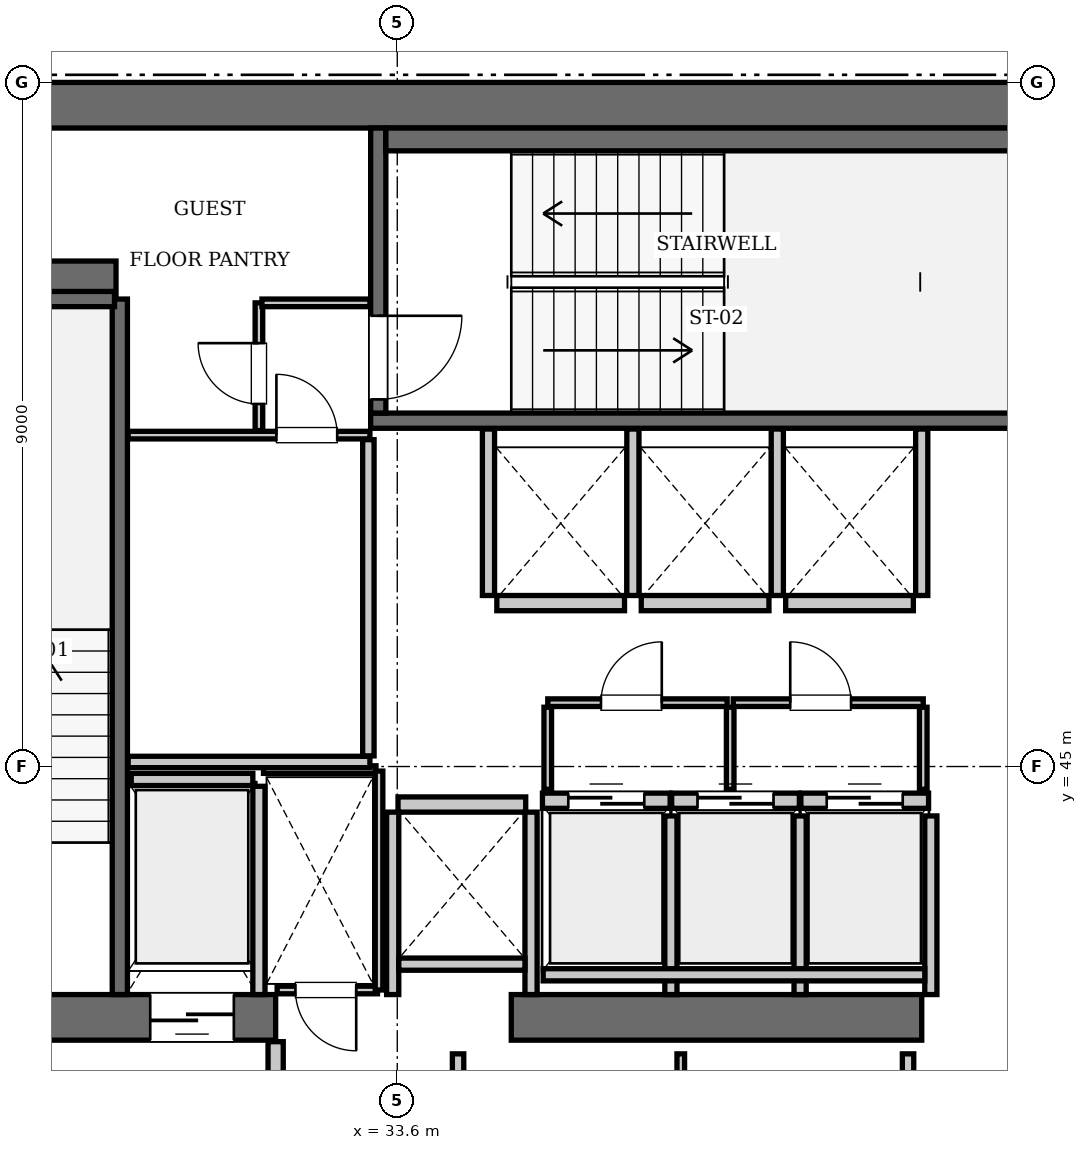
"""IFC4 building model, lengths in metres.
Left out: names, types, materials, properties, quantities, classifications, styles, units other than length and angle.
Written with IfcOpenShell. Run it as: python <this file> out.ifc"""

import sys

from ifc_helpers import new_model, si_unit, direction, frame, frame_2d, origin, place, context, subcontext, project, spatial, rectangle, extrude, element, fill, save


model = new_model("IFC4")
c1 = context("Model", 3, precision=1e-05, world=origin(), true_north=direction((0.0, 1.0)))
c2 = subcontext(c1, "Body", "Model", "MODEL_VIEW")
j1 = project(units=[si_unit("LENGTHUNIT", "METRE"), si_unit("PLANEANGLEUNIT", "RADIAN")], contexts=[c1])
p1 = place(None, origin())
s1 = spatial("IfcSite", under=j1, at=p1, CompositionType="ELEMENT")
p2 = place(p1, origin())
s2 = spatial("IfcBuilding", under=s1, at=p2, CompositionType="ELEMENT")
p3 = place(p2, frame((0.0, 0.0, 325.85)))
s3 = spatial("IfcBuildingStorey", under=s2, at=p3, CompositionType="ELEMENT", Elevation=325.85)
p4 = place(p3, frame((25.2, 53.7, 0.0), z_axis=(0.0, 0.0, 1.0), x_axis=(1.0, 0.0, 0.0)))
e1 = element("IfcWall", 1, at=p4, inside=s3, PredefinedType="SHEAR", context=c2, shape_type="SweptSolid", body=[
    extrude(rectangle(XDim=25.2, YDim=0.6, at=frame_2d((12.6, 0.0))), origin(), (0.0, 0.0, 1.0), 3.85),
])
p5 = place(p3, frame((25.2, 41.7, 0.0), z_axis=(0.0, 0.0, 1.0), x_axis=(1.0, 0.0, 0.0)))
e2 = element("IfcWall", 2, at=p5, inside=s3, PredefinedType="SHEAR", context=c2, shape_type="SweptSolid", body=[
    extrude(rectangle(XDim=6.8, YDim=0.6, at=frame_2d((3.4, 0.0))), origin(), (0.0, 0.0, 1.0), 3.85),
])
p6 = place(p5, frame((1.65, 0.0, 0.0)))
e3 = element("IfcOpeningElement", 3, at=p6, cuts=e2, PredefinedType="OPENING", context=c2, shape_type="SweptSolid", body=[
    extrude(rectangle(XDim=1.15, YDim=2.15, at=frame_2d((0.575, 1.075))), frame((0.0, 0.31, 0.0), z_axis=(0.0, -1.0, 0.0), x_axis=(1.0, 0.0, 0.0)), (0.0, 0.0, 1.0), 0.62),
])
p7 = place(p5, frame((5.15, 0.0, 0.0)))
e4 = element("IfcOpeningElement", 4, at=p7, cuts=e2, PredefinedType="OPENING", context=c2, shape_type="SweptSolid", body=[
    extrude(rectangle(XDim=1.1, YDim=2.2, at=frame_2d((0.55, 1.1))), frame((0.0, 0.31, 0.0), z_axis=(0.0, -1.0, 0.0), x_axis=(1.0, 0.0, 0.0)), (0.0, 0.0, 1.0), 0.62),
])
p8 = place(p3, frame((35.1, 41.7, 0.0), z_axis=(0.0, 0.0, 1.0), x_axis=(1.0, 0.0, 0.0)))
e5 = element("IfcWall", 5, at=p8, inside=s3, PredefinedType="SHEAR", context=c2, shape_type="SweptSolid", body=[
    extrude(rectangle(XDim=5.4, YDim=0.6, at=frame_2d((2.7, 0.0))), origin(), (0.0, 0.0, 1.0), 3.85),
])
p9 = place(p3, frame((25.8, 51.4, 0.0), z_axis=(0.0, 0.0, 1.0), x_axis=(1.0, 0.0, 0.0)))
e6 = element("IfcWall", 6, at=p9, inside=s3, PredefinedType="SHEAR", context=c2, shape_type="SweptSolid", body=[
    extrude(rectangle(XDim=4.1, YDim=0.5, at=frame_2d((2.05, 0.0))), origin(), (0.0, 0.0, 1.0), 3.85),
])
p10 = place(p3, frame((29.95, 42.0, 0.0), z_axis=(0.0, 0.0, 1.0), x_axis=(0.0, 1.0, 0.0)))
e7 = element("IfcWall", 7, at=p10, inside=s3, PredefinedType="SOLIDWALL", context=c2, shape_type="SweptSolid", body=[
    extrude(rectangle(XDim=9.15, YDim=0.2, at=frame_2d((4.575, 0.0))), origin(), (0.0, 0.0, 1.0), 3.61),
])
p11 = place(p3, frame((26.38, 51.15, 0.0), z_axis=(0.0, 0.0, 1.0), x_axis=(1.0, 0.0, 0.0)))
e8 = element("IfcWall", 8, at=p11, inside=s3, PredefinedType="SOLIDWALL", context=c2, shape_type="SweptSolid", body=[
    extrude(rectangle(XDim=3.5, YDim=0.2, at=frame_2d((1.75, 0.0))), origin(), (0.0, 0.0, 1.0), 3.61),
])
p12 = place(p3, frame((33.25, 49.55, 0.0), z_axis=(0.0, 0.0, 1.0), x_axis=(1.0, 0.0, 0.0)))
e9 = element("IfcWall", 9, at=p12, inside=s3, PredefinedType="SOLIDWALL", context=c2, shape_type="SweptSolid", body=[
    extrude(rectangle(XDim=9.1, YDim=0.2, at=frame_2d((4.55, 0.0))), origin(), (0.0, 0.0, 1.0), 3.61),
])
p13 = place(p3, frame((33.35, 49.65, 0.0), z_axis=(0.0, 0.0, 1.0), x_axis=(0.0, 1.0, 0.0)))
e10 = element("IfcWall", 10, at=p13, inside=s3, PredefinedType="SOLIDWALL", context=c2, shape_type="SweptSolid", body=[
    extrude(rectangle(XDim=3.75, YDim=0.2, at=frame_2d((1.875, 0.0))), origin(), (0.0, 0.0, 1.0), 3.61),
])
p14 = place(p13, frame((0.18, 0.0, 0.0)))
e11 = element("IfcOpeningElement", 11, at=p14, cuts=e10, PredefinedType="OPENING", context=c2, shape_type="SweptSolid", body=[
    extrude(rectangle(XDim=1.1, YDim=2.15, at=frame_2d((0.55, 1.075))), frame((0.0, 0.11, 0.0), z_axis=(0.0, -1.0, 0.0), x_axis=(1.0, 0.0, 0.0)), (0.0, 0.0, 1.0), 0.22),
])
p15 = place(p3, frame((33.45, 53.25, 0.0), z_axis=(0.0, 0.0, 1.0), x_axis=(1.0, 0.0, 0.0)))
e12 = element("IfcWall", 12, at=p15, inside=s3, PredefinedType="SOLIDWALL", context=c2, shape_type="SweptSolid", body=[
    extrude(rectangle(XDim=8.7, YDim=0.3, at=frame_2d((4.35, 0.0))), origin(), (0.0, 0.0, 1.0), 3.61),
])
p16 = place(p3, frame((35.51, 44.55, 0.0), z_axis=(0.0, 0.0, 1.0), x_axis=(1.0, 0.0, 0.0)))
e13 = element("IfcWall", 13, at=p16, inside=s3, PredefinedType="SOLIDWALL", context=c2, shape_type="SweptSolid", body=[
    extrude(rectangle(XDim=1.68, YDim=0.2, at=frame_2d((0.84, 0.0))), origin(), (0.0, 0.0, 1.0), 3.61),
])
p17 = place(p16, frame((0.34, 0.0, 0.0)))
e14 = element("IfcOpeningElement", 14, at=p17, cuts=e13, PredefinedType="OPENING", context=c2, shape_type="SweptSolid", body=[
    extrude(rectangle(XDim=1.0, YDim=2.15, at=frame_2d((0.5, 1.075))), frame((0.0, 0.11, 0.0), z_axis=(0.0, -1.0, 0.0), x_axis=(1.0, 0.0, 0.0)), (0.0, 0.0, 1.0), 0.22),
])
p18 = place(p3, frame((37.21, 44.55, 0.0), z_axis=(0.0, 0.0, 1.0), x_axis=(1.0, 0.0, 0.0)))
e15 = element("IfcWall", 15, at=p18, inside=s3, PredefinedType="SOLIDWALL", context=c2, shape_type="SweptSolid", body=[
    extrude(rectangle(XDim=1.68, YDim=0.2, at=frame_2d((0.84, 0.0))), origin(), (0.0, 0.0, 1.0), 3.61),
])
p19 = place(p18, frame((0.34, 0.0, 0.0)))
e16 = element("IfcOpeningElement", 16, at=p19, cuts=e15, PredefinedType="OPENING", context=c2, shape_type="SweptSolid", body=[
    extrude(rectangle(XDim=1.0, YDim=2.15, at=frame_2d((0.5, 1.075))), frame((0.0, 0.11, 0.0), z_axis=(0.0, -1.0, 0.0), x_axis=(1.0, 0.0, 0.0)), (0.0, 0.0, 1.0), 0.22),
])
p20 = place(p3, frame((38.91, 44.55, 0.0), z_axis=(0.0, 0.0, 1.0), x_axis=(1.0, 0.0, 0.0)))
e17 = element("IfcWall", 17, at=p20, inside=s3, PredefinedType="SOLIDWALL", context=c2, shape_type="SweptSolid", body=[
    extrude(rectangle(XDim=1.68, YDim=0.2, at=frame_2d((0.84, 0.0))), origin(), (0.0, 0.0, 1.0), 3.61),
])
p21 = place(p20, frame((0.34, 0.0, 0.0)))
e18 = element("IfcOpeningElement", 18, at=p21, cuts=e17, PredefinedType="OPENING", context=c2, shape_type="SweptSolid", body=[
    extrude(rectangle(XDim=1.0, YDim=2.15, at=frame_2d((0.5, 1.075))), frame((0.0, 0.11, 0.0), z_axis=(0.0, -1.0, 0.0), x_axis=(1.0, 0.0, 0.0)), (0.0, 0.0, 1.0), 0.22),
])
p22 = place(p3, frame((34.91, 47.15, 0.0), z_axis=(0.0, 0.0, 1.0), x_axis=(1.0, 0.0, 0.0)))
e19 = element("IfcWall", 19, at=p22, inside=s3, PredefinedType="SOLIDWALL", context=c2, shape_type="SweptSolid", body=[
    extrude(rectangle(XDim=1.68, YDim=0.2, at=frame_2d((0.84, 0.0))), origin(), (0.0, 0.0, 1.0), 3.61),
])
for number, where, z_axis, x_axis in (
    (20, (36.81, 47.15, 0.0), (0.0, 0.0, 1.0), (1.0, 0.0, 0.0)),
    (21, (38.71, 47.15, 0.0), (0.0, 0.0, 1.0), (1.0, 0.0, 0.0)),
    (22, (33.61, 44.5, 0.0), (0.0, 0.0, 1.0), (1.0, 0.0, 0.0)),
):
    element("IfcWall", number, at=place(p3, frame(where, z_axis=z_axis, x_axis=x_axis)), inside=s3, PredefinedType="SOLIDWALL", context=c2, shape_type="SweptSolid", body=[
        extrude(rectangle(XDim=1.68, YDim=0.2, at=frame_2d((0.84, 0.0))), origin(), (0.0, 0.0, 1.0), 3.61),
    ])
p23 = place(p3, frame((30.1, 44.83, 0.0), z_axis=(0.0, 0.0, 1.0), x_axis=(1.0, 0.0, 0.0)))
e23 = element("IfcWall", 23, at=p23, inside=s3, PredefinedType="SOLIDWALL", context=c2, shape_type="SweptSolid", body=[
    extrude(rectangle(XDim=1.6, YDim=0.16, at=frame_2d((0.8, 0.0))), origin(), (0.0, 0.0, 1.0), 3.61),
])
p24 = place(p3, frame((31.78, 42.0, 0.0), z_axis=(0.0, 0.0, 1.0), x_axis=(0.0, 1.0, 0.0)))
e24 = element("IfcWall", 24, at=p24, inside=s3, PredefinedType="SOLIDWALL", context=c2, shape_type="SweptSolid", body=[
    extrude(rectangle(XDim=2.74, YDim=0.16, at=frame_2d((1.37, 0.0))), origin(), (0.0, 0.0, 1.0), 3.61),
])
for number, where, z_axis, x_axis in (
    (25, (37.2, 42.0, 0.0), (0.0, 0.0, 1.0), (0.0, 1.0, 0.0)),
    (26, (38.9, 42.0, 0.0), (0.0, 0.0, 1.0), (0.0, 1.0, 0.0)),
    (27, (40.62, 42.0, 0.0), (0.0, 0.0, 1.0), (0.0, 1.0, 0.0)),
):
    element("IfcWall", number, at=place(p3, frame(where, z_axis=z_axis, x_axis=x_axis)), inside=s3, PredefinedType="SOLIDWALL", context=c2, shape_type="SweptSolid", body=[
        extrude(rectangle(XDim=2.35, YDim=0.16, at=frame_2d((1.175, 0.0))), origin(), (0.0, 0.0, 1.0), 3.61),
    ])
p25 = place(p3, frame((35.52, 42.26, 0.0), z_axis=(0.0, 0.0, 1.0), x_axis=(1.0, 0.0, 0.0)))
e28 = element("IfcWall", 28, at=p25, inside=s3, PredefinedType="SOLIDWALL", context=c2, shape_type="SweptSolid", body=[
    extrude(rectangle(XDim=5.02, YDim=0.16, at=frame_2d((2.51, 0.0))), origin(), (0.0, 0.0, 1.0), 3.61),
])
for number, where, z_axis, x_axis in (
    (29, (34.8, 47.25, 0.0), (0.0, 0.0, 1.0), (0.0, 1.0, 0.0)),
    (30, (36.7, 47.25, 0.0), (0.0, 0.0, 1.0), (0.0, 1.0, 0.0)),
    (31, (38.6, 47.25, 0.0), (0.0, 0.0, 1.0), (0.0, 1.0, 0.0)),
    (32, (40.5, 47.25, 0.0), (0.0, 0.0, 1.0), (0.0, 1.0, 0.0)),
):
    element("IfcWall", number, at=place(p3, frame(where, z_axis=z_axis, x_axis=x_axis)), inside=s3, PredefinedType="SOLIDWALL", context=c2, shape_type="SweptSolid", body=[
        extrude(rectangle(XDim=2.19, YDim=0.16, at=frame_2d((1.095, 0.0))), origin(), (0.0, 0.0, 1.0), 3.61),
    ])
for number, where, z_axis, x_axis in (
    (33, (33.54, 42.0, 0.0), (0.0, 0.0, 1.0), (0.0, 1.0, 0.0)),
    (34, (35.36, 42.0, 0.0), (0.0, 0.0, 1.0), (0.0, 1.0, 0.0)),
):
    element("IfcWall", number, at=place(p3, frame(where, z_axis=z_axis, x_axis=x_axis)), inside=s3, PredefinedType="SOLIDWALL", context=c2, shape_type="SweptSolid", body=[
        extrude(rectangle(XDim=2.4, YDim=0.16, at=frame_2d((1.2, 0.0))), origin(), (0.0, 0.0, 1.0), 3.61),
    ])
p26 = place(p3, frame((33.62, 42.4, 0.0), z_axis=(0.0, 0.0, 1.0), x_axis=(1.0, 0.0, 0.0)))
e35 = element("IfcWall", 35, at=p26, inside=s3, PredefinedType="SOLIDWALL", context=c2, shape_type="SweptSolid", body=[
    extrude(rectangle(XDim=1.66, YDim=0.16, at=frame_2d((0.83, 0.0))), origin(), (0.0, 0.0, 1.0), 3.61),
])
p27 = place(p3, frame((32.0, 38.31, 0.0), z_axis=(0.0, 0.0, 1.0), x_axis=(0.0, 1.0, 0.0)))
e36 = element("IfcWall", 36, at=p27, inside=s3, PredefinedType="PARTITIONING", context=c2, shape_type="SweptSolid", body=[
    extrude(rectangle(XDim=3.07, YDim=0.2, at=frame_2d((1.535, 0.0))), origin(), (0.0, 0.0, 1.0), 3.61),
])
p28 = place(p3, frame((32.02, 42.06, 0.0), z_axis=(0.0, 0.0, 1.0), x_axis=(1.0, 0.0, 0.0)))
e37 = element("IfcWall", 37, at=p28, inside=s3, PredefinedType="PARTITIONING", context=c2, shape_type="SweptSolid", body=[
    extrude(rectangle(XDim=1.32, YDim=0.1, at=frame_2d((0.66, 0.0))), origin(), (0.0, 0.0, 1.0), 3.61),
])
p29 = place(p28, frame((0.24, 0.0, 0.0)))
e38 = element("IfcOpeningElement", 38, at=p29, cuts=e37, PredefinedType="OPENING", context=c2, shape_type="SweptSolid", body=[
    extrude(rectangle(XDim=0.8, YDim=2.05, at=frame_2d((0.4, 1.025))), frame((0.0, 0.06, 0.0), z_axis=(0.0, -1.0, 0.0), x_axis=(1.0, 0.0, 0.0)), (0.0, 0.0, 1.0), 0.12),
])
p30 = place(p3, frame((31.84, 44.96, 0.0), z_axis=(0.0, 0.0, 1.0), x_axis=(1.0, 0.0, 0.0)))
e39 = element("IfcWall", 39, at=p30, inside=s3, PredefinedType="PARTITIONING", context=c2, shape_type="SweptSolid", body=[
    extrude(rectangle(XDim=1.48, YDim=0.1, at=frame_2d((0.74, 0.0))), origin(), (0.0, 0.0, 1.0), 3.61),
])
p31 = place(p3, frame((33.36, 42.06, 0.0), z_axis=(0.0, 0.0, 1.0), x_axis=(0.0, 1.0, 0.0)))
e40 = element("IfcWall", 40, at=p31, inside=s3, PredefinedType="PARTITIONING", context=c2, shape_type="SweptSolid", body=[
    extrude(rectangle(XDim=2.88, YDim=0.1, at=frame_2d((1.44, 0.0))), origin(), (0.0, 0.0, 1.0), 3.61),
])
p32 = place(p3, frame((35.58, 45.84, 0.0), z_axis=(0.0, 0.0, 1.0), x_axis=(1.0, 0.0, 0.0)))
e41 = element("IfcWall", 41, at=p32, inside=s3, PredefinedType="PARTITIONING", context=c2, shape_type="SweptSolid", body=[
    extrude(rectangle(XDim=2.36, YDim=0.1, at=frame_2d((1.18, 0.0))), origin(), (0.0, 0.0, 1.0), 3.61),
])
p33 = place(p32, frame((0.7, 0.0, 0.0)))
e42 = element("IfcOpeningElement", 42, at=p33, cuts=e41, PredefinedType="OPENING", context=c2, shape_type="SweptSolid", body=[
    extrude(rectangle(XDim=0.8, YDim=2.05, at=frame_2d((0.4, 1.025))), frame((0.0, 0.06, 0.0), z_axis=(0.0, -1.0, 0.0), x_axis=(1.0, 0.0, 0.0)), (0.0, 0.0, 1.0), 0.12),
])
p34 = place(p3, frame((38.02, 45.84, 0.0), z_axis=(0.0, 0.0, 1.0), x_axis=(1.0, 0.0, 0.0)))
e43 = element("IfcWall", 43, at=p34, inside=s3, PredefinedType="PARTITIONING", context=c2, shape_type="SweptSolid", body=[
    extrude(rectangle(XDim=2.5, YDim=0.1, at=frame_2d((1.25, 0.0))), origin(), (0.0, 0.0, 1.0), 3.61),
])
p35 = place(p34, frame((0.75, 0.0, 0.0)))
e44 = element("IfcOpeningElement", 44, at=p35, cuts=e43, PredefinedType="OPENING", context=c2, shape_type="SweptSolid", body=[
    extrude(rectangle(XDim=0.8, YDim=2.05, at=frame_2d((0.4, 1.025))), frame((0.0, 0.06, 0.0), z_axis=(0.0, -1.0, 0.0), x_axis=(1.0, 0.0, 0.0)), (0.0, 0.0, 1.0), 0.12),
])
for number, where, z_axis, x_axis in (
    (45, (35.58, 44.7, 0.0), (0.0, 0.0, 1.0), (0.0, 1.0, 0.0)),
    (46, (37.98, 44.7, 0.0), (0.0, 0.0, 1.0), (0.0, 1.0, 0.0)),
    (47, (40.52, 44.7, 0.0), (0.0, 0.0, 1.0), (0.0, 1.0, 0.0)),
):
    element("IfcWall", number, at=place(p3, frame(where, z_axis=z_axis, x_axis=x_axis)), inside=s3, PredefinedType="PARTITIONING", context=c2, shape_type="SweptSolid", body=[
        extrude(rectangle(XDim=1.08, YDim=0.1, at=frame_2d((0.54, 0.0))), origin(), (0.0, 0.0, 1.0), 3.61),
    ])
p36 = place(p3, frame((30.06, 45.06, 0.0), z_axis=(0.0, 0.0, 1.0), x_axis=(1.0, 0.0, 0.0)))
e48 = element("IfcWall", 48, at=p36, inside=s3, PredefinedType="PARTITIONING", context=c2, shape_type="SweptSolid", body=[
    extrude(rectangle(XDim=3.18, YDim=0.15, at=frame_2d((1.59, 0.0))), origin(), (0.0, 0.0, 1.0), 3.61),
])
p37 = place(p3, frame((33.22, 45.14, 0.0), z_axis=(0.0, 0.0, 1.0), x_axis=(0.0, 1.0, 0.0)))
e49 = element("IfcWall", 49, at=p37, inside=s3, PredefinedType="PARTITIONING", context=c2, shape_type="SweptSolid", body=[
    extrude(rectangle(XDim=4.16, YDim=0.15, at=frame_2d((2.08, 0.0))), origin(), (0.0, 0.0, 1.0), 3.61),
])
p38 = place(p3, frame((30.06, 49.36, 0.0), z_axis=(0.0, 0.0, 1.0), x_axis=(1.0, 0.0, 0.0)))
e50 = element("IfcWall", 50, at=p38, inside=s3, PredefinedType="PARTITIONING", context=c2, shape_type="SweptSolid", body=[
    extrude(rectangle(XDim=3.18, YDim=0.1, at=frame_2d((1.59, 0.0))), origin(), (0.0, 0.0, 1.0), 3.61),
])
p39 = place(p38, frame((1.95, 0.0, 0.0)))
e51 = element("IfcOpeningElement", 51, at=p39, cuts=e50, PredefinedType="OPENING", context=c2, shape_type="SweptSolid", body=[
    extrude(rectangle(XDim=0.8, YDim=2.05, at=frame_2d((0.4, 1.025))), frame((0.0, 0.06, 0.0), z_axis=(0.0, -1.0, 0.0), x_axis=(1.0, 0.0, 0.0)), (0.0, 0.0, 1.0), 0.12),
])
p40 = place(p3, frame((31.78, 49.42, 0.0), z_axis=(0.0, 0.0, 1.0), x_axis=(0.0, 1.0, 0.0)))
e52 = element("IfcWall", 52, at=p40, inside=s3, PredefinedType="PARTITIONING", context=c2, shape_type="SweptSolid", body=[
    extrude(rectangle(XDim=1.68, YDim=0.1, at=frame_2d((0.84, 0.0))), origin(), (0.0, 0.0, 1.0), 3.61),
])
p41 = place(p40, frame((0.35, 0.0, 0.0)))
e53 = element("IfcOpeningElement", 53, at=p41, cuts=e52, PredefinedType="OPENING", context=c2, shape_type="SweptSolid", body=[
    extrude(rectangle(XDim=0.8, YDim=2.05, at=frame_2d((0.4, 1.025))), frame((0.0, 0.06, 0.0), z_axis=(0.0, -1.0, 0.0), x_axis=(1.0, 0.0, 0.0)), (0.0, 0.0, 1.0), 0.12),
])
p42 = place(p3, frame((31.82, 51.1, 0.0), z_axis=(0.0, 0.0, 1.0), x_axis=(1.0, 0.0, 0.0)))
e54 = element("IfcWall", 54, at=p42, inside=s3, PredefinedType="PARTITIONING", context=c2, shape_type="SweptSolid", body=[
    extrude(rectangle(XDim=1.42, YDim=0.1, at=frame_2d((0.71, 0.0))), origin(), (0.0, 0.0, 1.0), 3.61),
])
p43 = place(p3, frame((34.4, 38.38, 0.0), z_axis=(0.0, 0.0, 1.0), x_axis=(0.0, 1.0, 0.0)))
e55 = element("IfcWall", 55, at=p43, inside=s3, PredefinedType="PARTITIONING", context=c2, shape_type="SweptSolid", body=[
    extrude(rectangle(XDim=2.84, YDim=0.15, at=frame_2d((1.42, 0.0))), origin(), (0.0, 0.0, 1.0), 3.61),
])
p44 = place(p3, frame((37.33, 38.38, 0.0), z_axis=(0.0, 0.0, 1.0), x_axis=(0.0, 1.0, 0.0)))
e56 = element("IfcWall", 56, at=p44, inside=s3, PredefinedType="PARTITIONING", context=c2, shape_type="SweptSolid", body=[
    extrude(rectangle(XDim=2.84, YDim=0.1, at=frame_2d((1.42, 0.0))), origin(), (0.0, 0.0, 1.0), 3.61),
])
p45 = place(p3, frame((40.32, 38.38, 0.0), z_axis=(0.0, 0.0, 1.0), x_axis=(0.0, 1.0, 0.0)))
e57 = element("IfcWall", 57, at=p45, inside=s3, PredefinedType="PARTITIONING", context=c2, shape_type="SweptSolid", body=[
    extrude(rectangle(XDim=2.84, YDim=0.15, at=frame_2d((1.42, 0.0))), origin(), (0.0, 0.0, 1.0), 3.61),
])
p46 = place(p14, frame((1.1, 0.0, 0.0), z_axis=(0.0, 0.0, 1.0), x_axis=(-1.0, 0.0, 0.0)))
e58 = element("IfcDoor", 58, at=p46, inside=s3, OperationType="SINGLE_SWING_LEFT", PredefinedType="DOOR", context=c2, shape_type="SweptSolid", body=[
    extrude(rectangle(XDim=1.1, YDim=2.15, at=frame_2d((0.55, 1.075))), frame((0.0, 0.025, 0.0), z_axis=(0.0, -1.0, 0.0), x_axis=(1.0, 0.0, 0.0)), (0.0, 0.0, 1.0), 0.05),
])
fill(e11, e58)
p47 = place(p17, origin())
e59 = element("IfcDoor", 59, at=p47, inside=s3, OperationType="SLIDING_TO_LEFT", PredefinedType="DOOR", context=c2, shape_type="SweptSolid", body=[
    extrude(rectangle(XDim=1.0, YDim=2.15, at=frame_2d((0.5, 1.075))), frame((0.0, 0.025, 0.0), z_axis=(0.0, -1.0, 0.0), x_axis=(1.0, 0.0, 0.0)), (0.0, 0.0, 1.0), 0.05),
])
fill(e14, e59)
p48 = place(p19, origin())
e60 = element("IfcDoor", 60, at=p48, inside=s3, OperationType="SLIDING_TO_LEFT", PredefinedType="DOOR", context=c2, shape_type="SweptSolid", body=[
    extrude(rectangle(XDim=1.0, YDim=2.15, at=frame_2d((0.5, 1.075))), frame((0.0, 0.025, 0.0), z_axis=(0.0, -1.0, 0.0), x_axis=(1.0, 0.0, 0.0)), (0.0, 0.0, 1.0), 0.05),
])
fill(e16, e60)
p49 = place(p21, origin())
e61 = element("IfcDoor", 61, at=p49, inside=s3, OperationType="SLIDING_TO_LEFT", PredefinedType="DOOR", context=c2, shape_type="SweptSolid", body=[
    extrude(rectangle(XDim=1.0, YDim=2.15, at=frame_2d((0.5, 1.075))), frame((0.0, 0.025, 0.0), z_axis=(0.0, -1.0, 0.0), x_axis=(1.0, 0.0, 0.0)), (0.0, 0.0, 1.0), 0.05),
])
fill(e18, e61)
p50 = place(p7, frame((1.1, 0.0, 0.0), z_axis=(0.0, 0.0, 1.0), x_axis=(-1.0, 0.0, 0.0)))
e62 = element("IfcDoor", 62, at=p50, inside=s3, OperationType="SLIDING_TO_LEFT", PredefinedType="DOOR", context=c2, shape_type="SweptSolid", body=[
    extrude(rectangle(XDim=1.1, YDim=2.2, at=frame_2d((0.55, 1.1))), frame((0.0, 0.025, 0.0), z_axis=(0.0, -1.0, 0.0), x_axis=(1.0, 0.0, 0.0)), (0.0, 0.0, 1.0), 0.05),
])
fill(e4, e62)
p51 = place(p29, frame((0.8, 0.0, 0.0), z_axis=(0.0, 0.0, 1.0), x_axis=(-1.0, 0.0, 0.0)))
e63 = element("IfcDoor", 63, at=p51, inside=s3, OperationType="SINGLE_SWING_LEFT", PredefinedType="DOOR", context=c2, shape_type="SweptSolid", body=[
    extrude(rectangle(XDim=0.8, YDim=2.05, at=frame_2d((0.4, 1.025))), frame((0.0, 0.025, 0.0), z_axis=(0.0, -1.0, 0.0), x_axis=(1.0, 0.0, 0.0)), (0.0, 0.0, 1.0), 0.05),
])
fill(e38, e63)
p52 = place(p33, origin())
e64 = element("IfcDoor", 64, at=p52, inside=s3, OperationType="SINGLE_SWING_RIGHT", PredefinedType="DOOR", context=c2, shape_type="SweptSolid", body=[
    extrude(rectangle(XDim=0.8, YDim=2.05, at=frame_2d((0.4, 1.025))), frame((0.0, 0.025, 0.0), z_axis=(0.0, -1.0, 0.0), x_axis=(1.0, 0.0, 0.0)), (0.0, 0.0, 1.0), 0.05),
])
fill(e42, e64)
p53 = place(p35, origin())
e65 = element("IfcDoor", 65, at=p53, inside=s3, OperationType="SINGLE_SWING_LEFT", PredefinedType="DOOR", context=c2, shape_type="SweptSolid", body=[
    extrude(rectangle(XDim=0.8, YDim=2.05, at=frame_2d((0.4, 1.025))), frame((0.0, 0.025, 0.0), z_axis=(0.0, -1.0, 0.0), x_axis=(1.0, 0.0, 0.0)), (0.0, 0.0, 1.0), 0.05),
])
fill(e44, e65)
p54 = place(p39, origin())
e66 = element("IfcDoor", 66, at=p54, inside=s3, OperationType="SINGLE_SWING_LEFT", PredefinedType="DOOR", context=c2, shape_type="SweptSolid", body=[
    extrude(rectangle(XDim=0.8, YDim=2.05, at=frame_2d((0.4, 1.025))), frame((0.0, 0.025, 0.0), z_axis=(0.0, -1.0, 0.0), x_axis=(1.0, 0.0, 0.0)), (0.0, 0.0, 1.0), 0.05),
])
fill(e51, e66)
p55 = place(p41, origin())
e67 = element("IfcDoor", 67, at=p55, inside=s3, OperationType="SINGLE_SWING_RIGHT", PredefinedType="DOOR", context=c2, shape_type="SweptSolid", body=[
    extrude(rectangle(XDim=0.8, YDim=2.05, at=frame_2d((0.4, 1.025))), frame((0.0, 0.025, 0.0), z_axis=(0.0, -1.0, 0.0), x_axis=(1.0, 0.0, 0.0)), (0.0, 0.0, 1.0), 0.05),
])
fill(e53, e67)
save(model, sys.argv[1])
